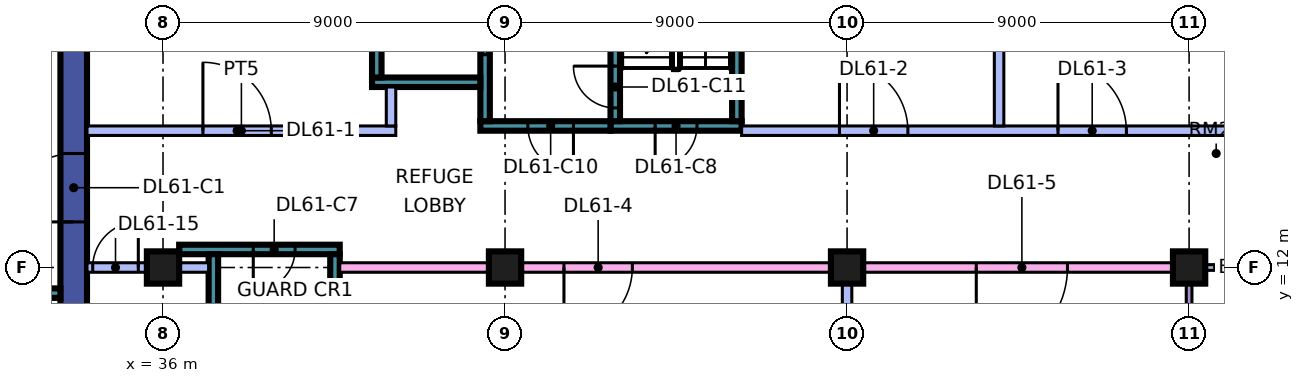
"""IFC4 building model, lengths in metres.
Left out: names, types, materials, properties, quantities, classifications, styles, units other than length and angle.
Written with IfcOpenShell. Run it as: python <this file> out.ifc"""

import sys

from ifc_helpers import new_model, si_unit, direction, frame, frame_2d, origin, origin_2d, place, context, subcontext, project, spatial, rectangle, extrude, element, fill, save


model = new_model("IFC4")
c1 = context("Model", 3, precision=1e-05, world=origin(), true_north=direction((0.0, 1.0)))
c2 = subcontext(c1, "Body", "Model", "MODEL_VIEW")
j1 = project(units=[si_unit("LENGTHUNIT", "METRE"), si_unit("PLANEANGLEUNIT", "RADIAN")], contexts=[c1])
p1 = place(None, origin())
s1 = spatial("IfcSite", under=j1, at=p1, CompositionType="ELEMENT")
p2 = place(p1, origin())
s2 = spatial("IfcBuilding", under=s1, at=p2, CompositionType="ELEMENT")
p3 = place(p2, frame((0.0, 0.0, 256.65)))
s3 = spatial("IfcBuildingStorey", under=s2, at=p3, CompositionType="ELEMENT", Elevation=256.65)
for number, where, z_axis, x_axis in (
    (1, (36.0, 12.0, 0.0), (0.0, 0.0, 1.0), (1.0, 0.0, 0.0)),
    (2, (45.0, 12.0, 0.0), (0.0, 0.0, 1.0), (1.0, 0.0, 0.0)),
    (3, (54.0, 12.0, 0.0), (0.0, 0.0, 1.0), (1.0, 0.0, 0.0)),
    (4, (63.0, 12.0, 0.0), (0.0, 0.0, 1.0), (1.0, 0.0, 0.0)),
):
    element("IfcColumn", number, at=place(p3, frame(where, z_axis=z_axis, x_axis=x_axis)), inside=s3, PredefinedType="COLUMN", context=c2, shape_type="SweptSolid", body=[
        extrude(rectangle(XDim=0.85, YDim=0.85, at=origin_2d()), origin(), (0.0, 0.0, 1.0), 5.5),
    ])
p4 = place(p3, frame((33.65, 7.7, 0.0), z_axis=(0.0, 0.0, 1.0), x_axis=(0.0, 1.0, 0.0)))
e5 = element("IfcWall", 5, at=p4, inside=s3, PredefinedType="SHEAR", context=c2, shape_type="SweptSolid", body=[
    extrude(rectangle(XDim=11.6, YDim=0.7, at=frame_2d((5.8, 0.0))), origin(), (0.0, 0.0, 1.0), 5.5),
])
p5 = place(p4, frame((5.5, 0.0, 0.0)))
e6 = element("IfcOpeningElement", 6, at=p5, cuts=e5, PredefinedType="OPENING", context=c2, shape_type="SweptSolid", body=[
    extrude(rectangle(XDim=1.8, YDim=2.4, at=frame_2d((0.9, 1.2))), frame((0.0, 0.36, 0.0), z_axis=(0.0, -1.0, 0.0), x_axis=(1.0, 0.0, 0.0)), (0.0, 0.0, 1.0), 0.72),
])
p6 = place(p3, frame((13.45, 11.325, 0.0), z_axis=(0.0, 0.0, 1.0), x_axis=(1.0, 0.0, 0.0)))
e7 = element("IfcWall", 7, at=p6, inside=s3, PredefinedType="SHEAR", context=c2, shape_type="SweptSolid", body=[
    extrude(rectangle(XDim=19.85, YDim=0.25, at=frame_2d((9.925, 0.0))), origin(), (0.0, 0.0, 1.0), 5.5),
])
p7 = place(p6, frame((11.65, 0.0, 0.0)))
e8 = element("IfcOpeningElement", 8, at=p7, cuts=e7, PredefinedType="OPENING", context=c2, shape_type="SweptSolid", body=[
    extrude(rectangle(XDim=1.2, YDim=2.2, at=frame_2d((0.6, 1.1))), frame((0.0, 0.135, 0.0), z_axis=(0.0, -1.0, 0.0), x_axis=(1.0, 0.0, 0.0)), (0.0, 0.0, 1.0), 0.27),
])
p8 = place(p6, frame((14.4, 0.0, 0.0)))
e9 = element("IfcOpeningElement", 9, at=p8, cuts=e7, PredefinedType="OPENING", context=c2, shape_type="SweptSolid", body=[
    extrude(rectangle(XDim=1.2, YDim=2.2, at=frame_2d((0.6, 1.1))), frame((0.0, 0.135, 0.0), z_axis=(0.0, -1.0, 0.0), x_axis=(1.0, 0.0, 0.0)), (0.0, 0.0, 1.0), 0.27),
])
p9 = place(p6, frame((17.15, 0.0, 0.0)))
e10 = element("IfcOpeningElement", 10, at=p9, cuts=e7, PredefinedType="OPENING", context=c2, shape_type="SweptSolid", body=[
    extrude(rectangle(XDim=1.2, YDim=2.2, at=frame_2d((0.6, 1.1))), frame((0.0, 0.135, 0.0), z_axis=(0.0, -1.0, 0.0), x_axis=(1.0, 0.0, 0.0)), (0.0, 0.0, 1.0), 0.27),
])
p10 = place(p6, frame((4.925, 0.0, 0.0)))
e11 = element("IfcOpeningElement", 11, at=p10, cuts=e7, PredefinedType="OPENING", context=c2, shape_type="SweptSolid", body=[
    extrude(rectangle(XDim=0.9, YDim=2.1, at=frame_2d((0.45, 1.05))), frame((0.0, 0.135, 0.0), z_axis=(0.0, -1.0, 0.0), x_axis=(1.0, 0.0, 0.0)), (0.0, 0.0, 1.0), 0.27),
])
p11 = place(p3, frame((36.425, 12.475, 0.0), z_axis=(0.0, 0.0, 1.0), x_axis=(1.0, 0.0, 0.0)))
e12 = element("IfcWall", 12, at=p11, inside=s3, PredefinedType="SHEAR", context=c2, shape_type="SweptSolid", body=[
    extrude(rectangle(XDim=4.225, YDim=0.25, at=frame_2d((2.112, 0.0))), origin(), (0.0, 0.0, 1.0), 5.5),
])
p12 = place(p11, frame((1.95, 0.0, 0.0)))
e13 = element("IfcOpeningElement", 13, at=p12, cuts=e12, PredefinedType="OPENING", context=c2, shape_type="SweptSolid", body=[
    extrude(rectangle(XDim=1.1, YDim=2.2, at=frame_2d((0.55, 1.1))), frame((0.0, 0.135, 0.0), z_axis=(0.0, -1.0, 0.0), x_axis=(1.0, 0.0, 0.0)), (0.0, 0.0, 1.0), 0.27),
])
for number, where, z_axis, x_axis in (
    (14, (37.325, 5.85, 0.0), (0.0, 0.0, 1.0), (0.0, 1.0, 0.0)),
    (15, (40.525, 5.85, 0.0), (0.0, 0.0, 1.0), (0.0, 1.0, 0.0)),
):
    element("IfcWall", number, at=place(p3, frame(where, z_axis=z_axis, x_axis=x_axis)), inside=s3, PredefinedType="SHEAR", context=c2, shape_type="SweptSolid", body=[
        extrude(rectangle(XDim=6.5, YDim=0.25, at=frame_2d((3.25, 0.0))), origin(), (0.0, 0.0, 1.0), 5.5),
    ])
p13 = place(p3, frame((47.775, 15.725, 0.0), z_axis=(0.0, 0.0, 1.0), x_axis=(1.0, 0.0, 0.0)))
e16 = element("IfcWall", 16, at=p13, inside=s3, PredefinedType="SHEAR", context=c2, shape_type="SweptSolid", body=[
    extrude(rectangle(XDim=3.45, YDim=0.25, at=frame_2d((1.725, 0.0))), origin(), (0.0, 0.0, 1.0), 5.5),
])
p14 = place(p13, frame((1.175, 0.0, 0.0)))
e17 = element("IfcOpeningElement", 17, at=p14, cuts=e16, PredefinedType="OPENING", context=c2, shape_type="SweptSolid", body=[
    extrude(rectangle(XDim=1.1, YDim=2.2, at=frame_2d((0.55, 1.1))), frame((0.0, 0.135, 0.0), z_axis=(0.0, -1.0, 0.0), x_axis=(1.0, 0.0, 0.0)), (0.0, 0.0, 1.0), 0.27),
])
p15 = place(p3, frame((47.9, 15.85, 0.0), z_axis=(0.0, 0.0, 1.0), x_axis=(0.0, 1.0, 0.0)))
e18 = element("IfcWall", 18, at=p15, inside=s3, PredefinedType="SHEAR", context=c2, shape_type="SweptSolid", body=[
    extrude(rectangle(XDim=6.5, YDim=0.25, at=frame_2d((3.25, 0.0))), origin(), (0.0, 0.0, 1.0), 5.5),
])
p16 = place(p15, frame((0.35, 0.0, 0.0)))
e19 = element("IfcOpeningElement", 19, at=p16, cuts=e18, PredefinedType="OPENING", context=c2, shape_type="SweptSolid", body=[
    extrude(rectangle(XDim=1.1, YDim=2.2, at=frame_2d((0.55, 1.1))), frame((0.0, 0.135, 0.0), z_axis=(0.0, -1.0, 0.0), x_axis=(1.0, 0.0, 0.0)), (0.0, 0.0, 1.0), 0.27),
])
p17 = place(p3, frame((51.1, 15.85, 0.0), z_axis=(0.0, 0.0, 1.0), x_axis=(0.0, 1.0, 0.0)))
e20 = element("IfcWall", 20, at=p17, inside=s3, PredefinedType="SHEAR", context=c2, shape_type="SweptSolid", body=[
    extrude(rectangle(XDim=6.5, YDim=0.25, at=frame_2d((3.25, 0.0))), origin(), (0.0, 0.0, 1.0), 5.5),
])
p18 = place(p3, frame((44.35, 15.725, 0.0), z_axis=(0.0, 0.0, 1.0), x_axis=(1.0, 0.0, 0.0)))
e21 = element("IfcWall", 21, at=p18, inside=s3, PredefinedType="SHEAR", context=c2, shape_type="SweptSolid", body=[
    extrude(rectangle(XDim=3.425, YDim=0.25, at=frame_2d((1.712, 0.0))), origin(), (0.0, 0.0, 1.0), 5.5),
])
p19 = place(p18, frame((1.25, 0.0, 0.0)))
e22 = element("IfcOpeningElement", 22, at=p19, cuts=e21, PredefinedType="OPENING", context=c2, shape_type="SweptSolid", body=[
    extrude(rectangle(XDim=1.2, YDim=2.2, at=frame_2d((0.6, 1.1))), frame((0.0, 0.135, 0.0), z_axis=(0.0, -1.0, 0.0), x_axis=(1.0, 0.0, 0.0)), (0.0, 0.0, 1.0), 0.27),
])
p20 = place(p3, frame((44.475, 15.85, 0.0), z_axis=(0.0, 0.0, 1.0), x_axis=(0.0, 1.0, 0.0)))
e23 = element("IfcWall", 23, at=p20, inside=s3, PredefinedType="SHEAR", context=c2, shape_type="SweptSolid", body=[
    extrude(rectangle(XDim=6.5, YDim=0.25, at=frame_2d((3.25, 0.0))), origin(), (0.0, 0.0, 1.0), 5.5),
])
p21 = place(p20, frame((1.75, 0.0, 0.0)))
e24 = element("IfcOpeningElement", 24, at=p21, cuts=e23, PredefinedType="OPENING", context=c2, shape_type="SweptSolid", body=[
    extrude(rectangle(XDim=1.1, YDim=2.2, at=frame_2d((0.55, 1.1))), frame((0.0, 0.135, 0.0), z_axis=(0.0, -1.0, 0.0), x_axis=(1.0, 0.0, 0.0)), (0.0, 0.0, 1.0), 0.27),
])
p22 = place(p20, frame((4.3, 0.0, 0.0)))
e25 = element("IfcOpeningElement", 25, at=p22, cuts=e23, PredefinedType="OPENING", context=c2, shape_type="SweptSolid", body=[
    extrude(rectangle(XDim=1.1, YDim=2.2, at=frame_2d((0.55, 1.1))), frame((0.0, 0.135, 0.0), z_axis=(0.0, -1.0, 0.0), x_axis=(1.0, 0.0, 0.0)), (0.0, 0.0, 1.0), 0.27),
])
p23 = place(p3, frame((41.5, 16.875, 0.0), z_axis=(0.0, 0.0, 1.0), x_axis=(1.0, 0.0, 0.0)))
e26 = element("IfcWall", 26, at=p23, inside=s3, PredefinedType="SHEAR", context=c2, shape_type="SweptSolid", body=[
    extrude(rectangle(XDim=2.85, YDim=0.25, at=frame_2d((1.425, 0.0))), origin(), (0.0, 0.0, 1.0), 5.5),
])
p24 = place(p3, frame((41.625, 17.0, 0.0), z_axis=(0.0, 0.0, 1.0), x_axis=(0.0, 1.0, 0.0)))
e27 = element("IfcWall", 27, at=p24, inside=s3, PredefinedType="SHEAR", context=c2, shape_type="SweptSolid", body=[
    extrude(rectangle(XDim=2.3, YDim=0.25, at=frame_2d((1.15, 0.0))), origin(), (0.0, 0.0, 1.0), 5.5),
])
p25 = place(p3, frame((63.0, 1.575, 0.0), z_axis=(0.0, 0.0, 1.0), x_axis=(0.0, 1.0, 0.0)))
e28 = element("IfcWall", 28, at=p25, inside=s3, PredefinedType="SOLIDWALL", context=c2, shape_type="SweptSolid", body=[
    extrude(rectangle(XDim=10.35, YDim=0.15, at=frame_2d((5.175, 0.0))), origin(), (0.0, 0.0, 1.0), 5.05),
])
p26 = place(p25, frame((3.45, 0.0, 0.45)))
e29 = element("IfcOpeningElement", 29, at=p26, cuts=e28, PredefinedType="OPENING", context=c2, shape_type="SweptSolid", body=[
    extrude(rectangle(XDim=3.0, YDim=3.6, at=frame_2d((1.5, 1.8))), frame((0.0, 0.085, 0.0), z_axis=(0.0, -1.0, 0.0), x_axis=(1.0, 0.0, 0.0)), (0.0, 0.0, 1.0), 0.17),
])
p27 = place(p3, frame((64.5, 12.0, 0.0), z_axis=(0.0, 0.0, 1.0), x_axis=(-1.0, 0.0, 0.0)))
e30 = element("IfcWall", 30, at=p27, inside=s3, PredefinedType="SOLIDWALL", context=c2, shape_type="SweptSolid", body=[
    extrude(rectangle(XDim=1.5, YDim=0.15, at=frame_2d((0.75, 0.0))), origin(), (0.0, 0.0, 1.0), 5.05),
])
p28 = place(p3, frame((34.0, 12.0, 0.0), z_axis=(0.0, 0.0, 1.0), x_axis=(1.0, 0.0, 0.0)))
e31 = element("IfcWall", 31, at=p28, inside=s3, PredefinedType="PARTITIONING", context=c2, shape_type="SweptSolid", body=[
    extrude(rectangle(XDim=3.2, YDim=0.25, at=frame_2d((1.6, 0.0))), origin(), (0.0, 0.0, 1.0), 5.05),
])
p29 = place(p28, frame((0.15, 0.0, 0.0)))
e32 = element("IfcOpeningElement", 32, at=p29, cuts=e31, PredefinedType="OPENING", context=c2, shape_type="SweptSolid", body=[
    extrude(rectangle(XDim=1.2, YDim=2.1, at=frame_2d((0.6, 1.05))), frame((0.0, 0.135, 0.0), z_axis=(0.0, -1.0, 0.0), x_axis=(1.0, 0.0, 0.0)), (0.0, 0.0, 1.0), 0.27),
])
p30 = place(p3, frame((34.0, 15.6, 0.0), z_axis=(0.0, 0.0, 1.0), x_axis=(1.0, 0.0, 0.0)))
e33 = element("IfcWall", 33, at=p30, inside=s3, PredefinedType="PARTITIONING", context=c2, shape_type="SweptSolid", body=[
    extrude(rectangle(XDim=8.125, YDim=0.25, at=frame_2d((4.062, 0.0))), origin(), (0.0, 0.0, 1.0), 5.05),
])
p31 = place(p30, frame((3.05, 0.0, 0.0)))
e34 = element("IfcOpeningElement", 34, at=p31, cuts=e33, PredefinedType="OPENING", context=c2, shape_type="SweptSolid", body=[
    extrude(rectangle(XDim=1.8, YDim=2.1, at=frame_2d((0.9, 1.05))), frame((0.0, 0.135, 0.0), z_axis=(0.0, -1.0, 0.0), x_axis=(1.0, 0.0, 0.0)), (0.0, 0.0, 1.0), 0.27),
])
p32 = place(p3, frame((40.65, 12.0, 0.0), z_axis=(0.0, 0.0, 1.0), x_axis=(1.0, 0.0, 0.0)))
e35 = element("IfcWall", 35, at=p32, inside=s3, PredefinedType="PARTITIONING", context=c2, shape_type="SweptSolid", body=[
    extrude(rectangle(XDim=22.35, YDim=0.25, at=frame_2d((11.175, 0.0))), origin(), (0.0, 0.0, 1.0), 2.45),
])
p33 = place(p32, frame((5.9, 0.0, 0.0)))
e36 = element("IfcOpeningElement", 36, at=p33, cuts=e35, PredefinedType="OPENING", context=c2, shape_type="SweptSolid", body=[
    extrude(rectangle(XDim=1.8, YDim=2.1, at=frame_2d((0.9, 1.05))), frame((0.0, 0.135, 0.0), z_axis=(0.0, -1.0, 0.0), x_axis=(1.0, 0.0, 0.0)), (0.0, 0.0, 1.0), 0.27),
])
p34 = place(p32, frame((16.75, 0.0, 0.0)))
e37 = element("IfcOpeningElement", 37, at=p34, cuts=e35, PredefinedType="OPENING", context=c2, shape_type="SweptSolid", body=[
    extrude(rectangle(XDim=2.4, YDim=2.1, at=frame_2d((1.2, 1.05))), frame((0.0, 0.135, 0.0), z_axis=(0.0, -1.0, 0.0), x_axis=(1.0, 0.0, 0.0)), (0.0, 0.0, 1.0), 0.27),
])
p35 = place(p3, frame((42.0, 15.725, 0.0), z_axis=(0.0, 0.0, 1.0), x_axis=(0.0, 1.0, 0.0)))
e38 = element("IfcWall", 38, at=p35, inside=s3, PredefinedType="PARTITIONING", context=c2, shape_type="SweptSolid", body=[
    extrude(rectangle(XDim=1.025, YDim=0.25, at=frame_2d((0.512, 0.0))), origin(), (0.0, 0.0, 1.0), 5.05),
])
p36 = place(p3, frame((51.225, 15.6, 0.0), z_axis=(0.0, 0.0, 1.0), x_axis=(1.0, 0.0, 0.0)))
e39 = element("IfcWall", 39, at=p36, inside=s3, PredefinedType="PARTITIONING", context=c2, shape_type="SweptSolid", body=[
    extrude(rectangle(XDim=13.125, YDim=0.25, at=frame_2d((6.562, 0.0))), origin(), (0.0, 0.0, 1.0), 5.05),
])
p37 = place(p36, frame((2.575, 0.0, 0.0)))
e40 = element("IfcOpeningElement", 40, at=p37, cuts=e39, PredefinedType="OPENING", context=c2, shape_type="SweptSolid", body=[
    extrude(rectangle(XDim=1.8, YDim=2.1, at=frame_2d((0.9, 1.05))), frame((0.0, 0.135, 0.0), z_axis=(0.0, -1.0, 0.0), x_axis=(1.0, 0.0, 0.0)), (0.0, 0.0, 1.0), 0.27),
])
p38 = place(p36, frame((8.325, 0.0, 0.0)))
e41 = element("IfcOpeningElement", 41, at=p38, cuts=e39, PredefinedType="OPENING", context=c2, shape_type="SweptSolid", body=[
    extrude(rectangle(XDim=1.8, YDim=2.1, at=frame_2d((0.9, 1.05))), frame((0.0, 0.135, 0.0), z_axis=(0.0, -1.0, 0.0), x_axis=(1.0, 0.0, 0.0)), (0.0, 0.0, 1.0), 0.27),
])
p39 = place(p3, frame((54.0, 0.074, 0.0), z_axis=(0.0, 0.0, 1.0), x_axis=(0.0, 1.0, 0.0)))
e42 = element("IfcWall", 42, at=p39, inside=s3, PredefinedType="PARTITIONING", context=c2, shape_type="SweptSolid", body=[
    extrude(rectangle(XDim=11.801, YDim=0.25, at=frame_2d((5.9, 0.0))), origin(), (0.0, 0.0, 1.0), 5.05),
])
p40 = place(p3, frame((58.0, 15.725, 0.0), z_axis=(0.0, 0.0, 1.0), x_axis=(0.0, 1.0, 0.0)))
e43 = element("IfcWall", 43, at=p40, inside=s3, PredefinedType="PARTITIONING", context=c2, shape_type="SweptSolid", body=[
    extrude(rectangle(XDim=8.201, YDim=0.25, at=frame_2d((4.101, 0.0))), origin(), (0.0, 0.0, 1.0), 5.05),
])
p41 = place(p5, origin())
e44 = element("IfcDoor", 44, at=p41, inside=s3, OperationType="DOUBLE_DOOR_SINGLE_SWING", PredefinedType="DOOR", context=c2, shape_type="SweptSolid", body=[
    extrude(rectangle(XDim=1.8, YDim=2.4, at=frame_2d((0.9, 1.2))), frame((0.0, 0.025, 0.0), z_axis=(0.0, -1.0, 0.0), x_axis=(1.0, 0.0, 0.0)), (0.0, 0.0, 1.0), 0.05),
])
fill(e6, e44)
p42 = place(p12, frame((1.1, 0.0, 0.0), z_axis=(0.0, 0.0, 1.0), x_axis=(-1.0, 0.0, 0.0)))
e45 = element("IfcDoor", 45, at=p42, inside=s3, OperationType="SINGLE_SWING_LEFT", PredefinedType="DOOR", context=c2, shape_type="SweptSolid", body=[
    extrude(rectangle(XDim=1.1, YDim=2.2, at=frame_2d((0.55, 1.1))), frame((0.0, 0.025, 0.0), z_axis=(0.0, -1.0, 0.0), x_axis=(1.0, 0.0, 0.0)), (0.0, 0.0, 1.0), 0.05),
])
fill(e13, e45)
p43 = place(p14, frame((1.1, 0.0, 0.0), z_axis=(0.0, 0.0, 1.0), x_axis=(-1.0, 0.0, 0.0)))
e46 = element("IfcDoor", 46, at=p43, inside=s3, OperationType="SINGLE_SWING_LEFT", PredefinedType="DOOR", context=c2, shape_type="SweptSolid", body=[
    extrude(rectangle(XDim=1.1, YDim=2.2, at=frame_2d((0.55, 1.1))), frame((0.0, 0.025, 0.0), z_axis=(0.0, -1.0, 0.0), x_axis=(1.0, 0.0, 0.0)), (0.0, 0.0, 1.0), 0.05),
])
fill(e17, e46)
p44 = place(p19, origin())
e47 = element("IfcDoor", 47, at=p44, inside=s3, OperationType="SINGLE_SWING_RIGHT", PredefinedType="DOOR", context=c2, shape_type="SweptSolid", body=[
    extrude(rectangle(XDim=1.2, YDim=2.2, at=frame_2d((0.6, 1.1))), frame((0.0, 0.025, 0.0), z_axis=(0.0, -1.0, 0.0), x_axis=(1.0, 0.0, 0.0)), (0.0, 0.0, 1.0), 0.05),
])
fill(e22, e47)
p45 = place(p16, frame((1.1, 0.0, 0.0), z_axis=(0.0, 0.0, 1.0), x_axis=(-1.0, 0.0, 0.0)))
e48 = element("IfcDoor", 48, at=p45, inside=s3, OperationType="SINGLE_SWING_RIGHT", PredefinedType="DOOR", context=c2, shape_type="SweptSolid", body=[
    extrude(rectangle(XDim=1.1, YDim=2.2, at=frame_2d((0.55, 1.1))), frame((0.0, 0.025, 0.0), z_axis=(0.0, -1.0, 0.0), x_axis=(1.0, 0.0, 0.0)), (0.0, 0.0, 1.0), 0.05),
])
fill(e19, e48)
p46 = place(p21, origin())
e49 = element("IfcDoor", 49, at=p46, inside=s3, OperationType="DOUBLE_DOOR_SLIDING", PredefinedType="DOOR", context=c2, shape_type="SweptSolid", body=[
    extrude(rectangle(XDim=1.1, YDim=2.2, at=frame_2d((0.55, 1.1))), frame((0.0, 0.025, 0.0), z_axis=(0.0, -1.0, 0.0), x_axis=(1.0, 0.0, 0.0)), (0.0, 0.0, 1.0), 0.05),
])
fill(e24, e49)
p47 = place(p31, origin())
e50 = element("IfcDoor", 50, at=p47, inside=s3, OperationType="DOUBLE_DOOR_SINGLE_SWING", PredefinedType="DOOR", context=c2, shape_type="SweptSolid", body=[
    extrude(rectangle(XDim=1.8, YDim=2.1, at=frame_2d((0.9, 1.05))), frame((0.0, 0.025, 0.0), z_axis=(0.0, -1.0, 0.0), x_axis=(1.0, 0.0, 0.0)), (0.0, 0.0, 1.0), 0.05),
])
fill(e34, e50)
p48 = place(p37, origin())
e51 = element("IfcDoor", 51, at=p48, inside=s3, OperationType="DOUBLE_DOOR_SINGLE_SWING", PredefinedType="DOOR", context=c2, shape_type="SweptSolid", body=[
    extrude(rectangle(XDim=1.8, YDim=2.1, at=frame_2d((0.9, 1.05))), frame((0.0, 0.025, 0.0), z_axis=(0.0, -1.0, 0.0), x_axis=(1.0, 0.0, 0.0)), (0.0, 0.0, 1.0), 0.05),
])
fill(e40, e51)
p49 = place(p38, origin())
e52 = element("IfcDoor", 52, at=p49, inside=s3, OperationType="DOUBLE_DOOR_SINGLE_SWING", PredefinedType="DOOR", context=c2, shape_type="SweptSolid", body=[
    extrude(rectangle(XDim=1.8, YDim=2.1, at=frame_2d((0.9, 1.05))), frame((0.0, 0.025, 0.0), z_axis=(0.0, -1.0, 0.0), x_axis=(1.0, 0.0, 0.0)), (0.0, 0.0, 1.0), 0.05),
])
fill(e41, e52)
p50 = place(p33, frame((1.8, 0.0, 0.0), z_axis=(0.0, 0.0, 1.0), x_axis=(-1.0, 0.0, 0.0)))
e53 = element("IfcDoor", 53, at=p50, inside=s3, OperationType="DOUBLE_DOOR_SINGLE_SWING", PredefinedType="DOOR", context=c2, shape_type="SweptSolid", body=[
    extrude(rectangle(XDim=1.8, YDim=2.1, at=frame_2d((0.9, 1.05))), frame((0.0, 0.025, 0.0), z_axis=(0.0, -1.0, 0.0), x_axis=(1.0, 0.0, 0.0)), (0.0, 0.0, 1.0), 0.05),
])
fill(e36, e53)
p51 = place(p34, frame((2.4, 0.0, 0.0), z_axis=(0.0, 0.0, 1.0), x_axis=(-1.0, 0.0, 0.0)))
e54 = element("IfcDoor", 54, at=p51, inside=s3, OperationType="DOUBLE_DOOR_SINGLE_SWING", PredefinedType="DOOR", context=c2, shape_type="SweptSolid", body=[
    extrude(rectangle(XDim=2.4, YDim=2.1, at=frame_2d((1.2, 1.05))), frame((0.0, 0.025, 0.0), z_axis=(0.0, -1.0, 0.0), x_axis=(1.0, 0.0, 0.0)), (0.0, 0.0, 1.0), 0.05),
])
fill(e37, e54)
p52 = place(p29, frame((1.2, 0.0, 0.0), z_axis=(0.0, 0.0, 1.0), x_axis=(-1.0, 0.0, 0.0)))
e55 = element("IfcDoor", 55, at=p52, inside=s3, OperationType="SINGLE_SWING_RIGHT", PredefinedType="DOOR", context=c2, shape_type="SweptSolid", body=[
    extrude(rectangle(XDim=1.2, YDim=2.1, at=frame_2d((0.6, 1.05))), frame((0.0, 0.025, 0.0), z_axis=(0.0, -1.0, 0.0), x_axis=(1.0, 0.0, 0.0)), (0.0, 0.0, 1.0), 0.05),
])
fill(e32, e55)
save(model, sys.argv[1])
